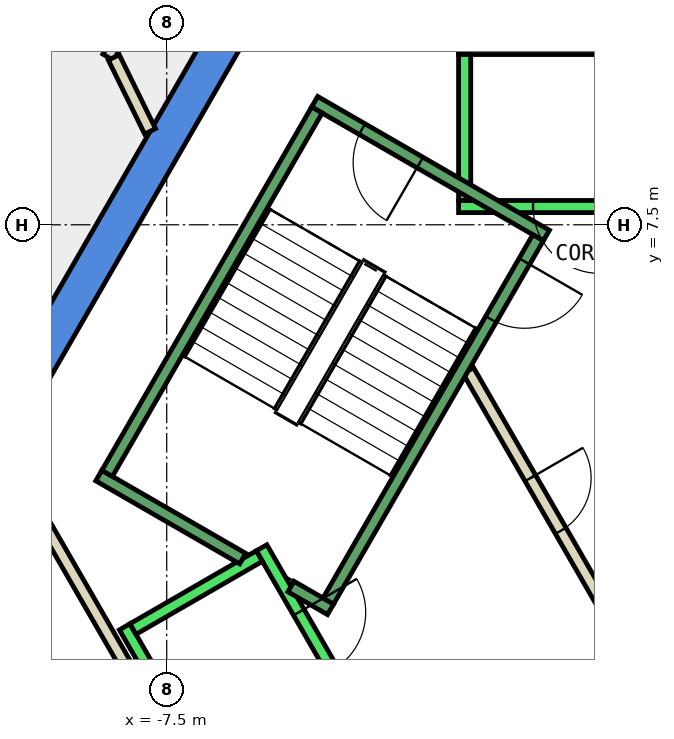
"""IFC4 building model, lengths in metres.
Left out: names, types, materials, properties, quantities, classifications, styles, units other than length and angle.
Written with IfcOpenShell. Run it as: python <this file> out.ifc"""

import sys

from ifc_helpers import new_model, si_unit, direction, frame, frame_2d, origin, place, context, subcontext, project, spatial, polyline, rectangle, outline, extrude, element, fill, save


model = new_model("IFC4")
c1 = context("Model", 3, precision=1e-05, world=origin(), true_north=direction((0.0, 1.0)))
c2 = subcontext(c1, "Body", "Model", "MODEL_VIEW")
j1 = project(units=[si_unit("LENGTHUNIT", "METRE"), si_unit("PLANEANGLEUNIT", "RADIAN")], contexts=[c1])
p1 = place(None, origin())
s1 = spatial("IfcSite", under=j1, at=p1, CompositionType="ELEMENT")
p2 = place(p1, origin())
s2 = spatial("IfcBuilding", under=s1, at=p2, CompositionType="ELEMENT")
p3 = place(p2, frame((0.0, 0.0, 266.6)))
s3 = spatial("IfcBuildingStorey", under=s2, at=p3, CompositionType="ELEMENT", Elevation=266.6)
p4 = place(p3, frame((0.0, 0.0, -0.34)))
e1 = element("IfcWall", 1, at=p4, inside=s3, PredefinedType="SHEAR", context=c2, shape_type="SweptSolid", body=[
    extrude(outline(polyline([(-10.535, 4.253), (-10.015, 3.953), (-5.427, 11.9), (-5.774, 12.5), (-10.535, 4.253)])), origin(), (0.0, 0.0, 1.0), 3.6),
])
p5 = place(p3, frame((0.0, 0.0, -0.34)))
e2 = element("IfcWall", 2, at=p5, inside=s3, PredefinedType="SHEAR", context=c2, shape_type="SweptSolid", body=[
    extrude(outline(polyline([(-11.547, 2.5), (-5.774, -7.5), (-5.427, -6.9), (-10.854, 2.5), (-11.547, 2.5)])), origin(), (0.0, 0.0, 1.0), 3.6),
])
p6 = place(p3, frame((-6.054, 14.264, 0.0), z_axis=(0.0, 0.0, 1.0), x_axis=(-0.515508653897, -0.856884372455, 0.0)))
e3 = element("IfcWall", 3, at=p6, inside=s3, PredefinedType="PARTITIONING", context=c2, shape_type="SweptSolid", body=[
    extrude(rectangle(XDim=4.677, YDim=0.2, at=frame_2d((2.339, 0.0))), origin(), (0.0, 0.0, 1.0), 3.26),
])
p7 = place(p6, frame((1.839, 0.0, 0.0)))
e4 = element("IfcOpeningElement", 4, at=p7, cuts=e3, PredefinedType="OPENING", context=c2, shape_type="SweptSolid", body=[
    extrude(rectangle(XDim=1.0, YDim=2.1, at=frame_2d((0.5, 1.05))), frame((0.0, 0.11, 0.0), z_axis=(0.0, -1.0, 0.0), x_axis=(1.0, 0.0, 0.0)), (0.0, 0.0, 1.0), 0.22),
])
p8 = place(p3, frame((-8.37, 10.252, 0.0), z_axis=(0.0, 0.0, 1.0), x_axis=(0.440562172885, -0.897722101668, 0.0)))
e5 = element("IfcWall", 5, at=p8, inside=s3, PredefinedType="PARTITIONING", context=c2, shape_type="SweptSolid", body=[
    extrude(rectangle(XDim=1.353, YDim=0.2, at=frame_2d((0.677, 0.0))), origin(), (0.0, 0.0, 1.0), 3.26),
])
p9 = place(p3, frame((-10.919, 10.057, 0.0), z_axis=(0.0, 0.0, 1.0), x_axis=(0.515568955032, 0.856848091908, 0.0)))
e6 = element("IfcWall", 6, at=p9, inside=s3, PredefinedType="PARTITIONING", context=c2, shape_type="SweptSolid", body=[
    extrude(rectangle(XDim=3.177, YDim=0.2, at=frame_2d((1.588, 0.0))), origin(), (0.0, 0.0, 1.0), 3.26),
])
p10 = place(p9, frame((1.088, 0.0, 0.0)))
e7 = element("IfcOpeningElement", 7, at=p10, cuts=e6, PredefinedType="OPENING", context=c2, shape_type="SweptSolid", body=[
    extrude(rectangle(XDim=1.0, YDim=2.1, at=frame_2d((0.5, 1.05))), frame((0.0, 0.11, 0.0), z_axis=(0.0, -1.0, 0.0), x_axis=(1.0, 0.0, 0.0)), (0.0, 0.0, 1.0), 0.22),
])
p11 = place(p3, frame((-9.751, 2.99, 0.0), z_axis=(0.0, 0.0, 1.0), x_axis=(0.500012163284, -0.866018381195, 0.0)))
e8 = element("IfcWall", 8, at=p11, inside=s3, PredefinedType="PARTITIONING", context=c2, shape_type="SweptSolid", body=[
    extrude(rectangle(XDim=8.0, YDim=0.2, at=frame_2d((4.0, 0.0))), origin(), (0.0, 0.0, 1.0), 3.26),
])
p12 = place(p3, frame((-0.982, -1.0, 0.0), z_axis=(0.0, 0.0, 1.0), x_axis=(0.50024047865, 0.865886518847, 0.0)))
e9 = element("IfcWall", 9, at=p12, inside=s3, PredefinedType="PARTITIONING", context=c2, shape_type="SweptSolid", body=[
    extrude(rectangle(XDim=1.863, YDim=0.2, at=frame_2d((0.931, 0.0))), origin(), (0.0, 0.0, 1.0), 3.26),
])
p13 = place(p3, frame((-2.54, 5.1, 0.0), z_axis=(0.0, 0.0, 1.0), x_axis=(0.499925051871, -0.866068670783, 0.0)))
e10 = element("IfcWall", 10, at=p13, inside=s3, PredefinedType="PARTITIONING", context=c2, shape_type="SweptSolid", body=[
    extrude(rectangle(XDim=5.181, YDim=0.2, at=frame_2d((2.59, 0.0))), origin(), (0.0, 0.0, 1.0), 3.26),
])
p14 = place(p13, frame((2.04, 0.0, 0.0)))
e11 = element("IfcOpeningElement", 11, at=p14, cuts=e10, PredefinedType="OPENING", context=c2, shape_type="SweptSolid", body=[
    extrude(rectangle(XDim=1.0, YDim=2.1, at=frame_2d((0.5, 1.05))), frame((0.0, 0.11, 0.0), z_axis=(0.0, -1.0, 0.0), x_axis=(1.0, 0.0, 0.0)), (0.0, 0.0, 1.0), 0.22),
])
p15 = place(p3, frame((2.7, 7.8, 0.0), z_axis=(0.0, 0.0, 1.0), x_axis=(-1.0, 0.0, 0.0)))
e12 = element("IfcWall", 12, at=p15, inside=s3, PredefinedType="STANDARD", context=c2, shape_type="SweptSolid", body=[
    extrude(rectangle(XDim=5.4, YDim=0.2, at=frame_2d((2.7, 0.0))), origin(), (0.0, 0.0, 1.0), 3.26),
])
p16 = place(p15, frame((1.225, 0.0, 0.0)))
e13 = element("IfcOpeningElement", 13, at=p16, cuts=e12, PredefinedType="OPENING", context=c2, shape_type="SweptSolid", body=[
    extrude(rectangle(XDim=1.1, YDim=2.1, at=frame_2d((0.55, 1.05))), frame((0.0, 0.11, 0.0), z_axis=(0.0, -1.0, 0.0), x_axis=(1.0, 0.0, 0.0)), (0.0, 0.0, 1.0), 0.22),
])
p17 = place(p15, frame((3.075, 0.0, 0.0)))
e14 = element("IfcOpeningElement", 14, at=p17, cuts=e12, PredefinedType="OPENING", context=c2, shape_type="SweptSolid", body=[
    extrude(rectangle(XDim=1.1, YDim=2.1, at=frame_2d((0.55, 1.05))), frame((0.0, 0.11, 0.0), z_axis=(0.0, -1.0, 0.0), x_axis=(1.0, 0.0, 0.0)), (0.0, 0.0, 1.0), 0.22),
])
p18 = place(p3, frame((2.7, 10.4, 0.0), z_axis=(0.0, 0.0, 1.0), x_axis=(-1.0, 0.0, 0.0)))
e15 = element("IfcWall", 15, at=p18, inside=s3, PredefinedType="STANDARD", context=c2, shape_type="SweptSolid", body=[
    extrude(rectangle(XDim=5.4, YDim=0.2, at=frame_2d((2.7, 0.0))), origin(), (0.0, 0.0, 1.0), 3.26),
])
p19 = place(p3, frame((-2.6, 7.9, 0.0), z_axis=(0.0, 0.0, 1.0), x_axis=(0.0, 1.0, 0.0)))
e16 = element("IfcWall", 16, at=p19, inside=s3, PredefinedType="STANDARD", context=c2, shape_type="SweptSolid", body=[
    extrude(rectangle(XDim=2.4, YDim=0.2, at=frame_2d((1.2, 0.0))), origin(), (0.0, 0.0, 1.0), 3.26),
])
p20 = place(p3, frame((-5.94, 2.188, 0.0), z_axis=(0.0, 0.0, 1.0), x_axis=(0.500034260056, -0.866005622828, 0.0)))
e17 = element("IfcWall", 17, at=p20, inside=s3, PredefinedType="STANDARD", context=c2, shape_type="SweptSolid", body=[
    extrude(rectangle(XDim=5.399, YDim=0.2, at=frame_2d((2.7, 0.0))), origin(), (0.0, 0.0, 1.0), 3.26),
])
p21 = place(p20, frame((3.075, 0.0, 0.0)))
e18 = element("IfcOpeningElement", 18, at=p21, cuts=e17, PredefinedType="OPENING", context=c2, shape_type="SweptSolid", body=[
    extrude(rectangle(XDim=1.1, YDim=2.1, at=frame_2d((0.55, 1.05))), frame((0.0, 0.11, 0.0), z_axis=(0.0, -1.0, 0.0), x_axis=(1.0, 0.0, 0.0)), (0.0, 0.0, 1.0), 0.22),
])
p22 = place(p20, frame((1.225, 0.0, 0.0)))
e19 = element("IfcOpeningElement", 19, at=p22, cuts=e17, PredefinedType="OPENING", context=c2, shape_type="SweptSolid", body=[
    extrude(rectangle(XDim=1.1, YDim=2.1, at=frame_2d((0.55, 1.05))), frame((0.0, 0.11, 0.0), z_axis=(0.0, -1.0, 0.0), x_axis=(1.0, 0.0, 0.0)), (0.0, 0.0, 1.0), 0.22),
])
p23 = place(p3, frame((-8.192, 0.888, 0.0), z_axis=(0.0, 0.0, 1.0), x_axis=(0.500034260056, -0.866005622828, 0.0)))
e20 = element("IfcWall", 20, at=p23, inside=s3, PredefinedType="STANDARD", context=c2, shape_type="SweptSolid", body=[
    extrude(rectangle(XDim=5.399, YDim=0.2, at=frame_2d((2.7, 0.0))), origin(), (0.0, 0.0, 1.0), 3.26),
])
p24 = place(p3, frame((-5.977, 2.052, 0.0), z_axis=(0.0, 0.0, 1.0), x_axis=(-0.865973769406, -0.500089422704, 0.0)))
e21 = element("IfcWall", 21, at=p24, inside=s3, PredefinedType="STANDARD", context=c2, shape_type="SweptSolid", body=[
    extrude(rectangle(XDim=2.399, YDim=0.2, at=frame_2d((1.2, 0.0))), origin(), (0.0, 0.0, 1.0), 3.26),
])
p25 = place(p3, frame((-1.256, 7.324, 0.0), z_axis=(0.0, 0.0, 1.0), x_axis=(-0.866046073146, 0.499964197906, 0.0)))
e22 = element("IfcWall", 22, at=p25, inside=s3, PredefinedType="STANDARD", context=c2, shape_type="SweptSolid", body=[
    extrude(rectangle(XDim=4.4, YDim=0.2, at=frame_2d((2.2, 0.0))), origin(), (0.0, 0.0, 1.0), 3.26),
])
p26 = place(p25, frame((2.4, 0.0, 0.0)))
e23 = element("IfcOpeningElement", 23, at=p26, cuts=e22, PredefinedType="OPENING", context=c2, shape_type="SweptSolid", body=[
    extrude(rectangle(XDim=1.1, YDim=2.2, at=frame_2d((0.55, 1.1))), frame((0.0, 0.11, 0.0), z_axis=(0.0, -1.0, 0.0), x_axis=(1.0, 0.0, 0.0)), (0.0, 0.0, 1.0), 0.22),
])
p27 = place(p3, frame((-6.25, 2.01, 0.0), z_axis=(0.0, 0.0, 1.0), x_axis=(-0.86611865017, 0.499838457731, 0.0)))
e24 = element("IfcWall", 24, at=p27, inside=s3, PredefinedType="STANDARD", context=c2, shape_type="SweptSolid", body=[
    extrude(rectangle(XDim=2.733, YDim=0.2, at=frame_2d((1.366, 0.0))), origin(), (0.0, 0.0, 1.0), 3.26),
])
p28 = place(p3, frame((-4.806, 1.176, 0.0), z_axis=(0.0, 0.0, 1.0), x_axis=(-0.866558586415, 0.499075361355, 0.0)))
e25 = element("IfcWall", 25, at=p28, inside=s3, PredefinedType="STANDARD", context=c2, shape_type="SweptSolid", body=[
    extrude(rectangle(XDim=0.751, YDim=0.2, at=frame_2d((0.376, 0.0))), origin(), (0.0, 0.0, 1.0), 3.26),
])
p29 = place(p3, frame((-1.393, 7.288, 0.0), z_axis=(0.0, 0.0, 1.0), x_axis=(-0.499963383562, -0.866046543262, 0.0)))
e26 = element("IfcWall", 26, at=p29, inside=s3, PredefinedType="STANDARD", context=c2, shape_type="SweptSolid", body=[
    extrude(rectangle(XDim=6.9, YDim=0.2, at=frame_2d((3.45, 0.0))), origin(), (0.0, 0.0, 1.0), 3.26),
])
p30 = place(p29, frame((0.45, 0.0, 0.0)))
e27 = element("IfcOpeningElement", 27, at=p30, cuts=e26, PredefinedType="OPENING", context=c2, shape_type="SweptSolid", body=[
    extrude(rectangle(XDim=1.1, YDim=2.2, at=frame_2d((0.55, 1.1))), frame((0.0, 0.11, 0.0), z_axis=(0.0, -1.0, 0.0), x_axis=(1.0, 0.0, 0.0)), (0.0, 0.0, 1.0), 0.22),
])
p31 = place(p3, frame((-5.03, 9.388, 0.0), z_axis=(0.0, 0.0, 1.0), x_axis=(-0.499978703459, -0.866037698999, 0.0)))
e28 = element("IfcWall", 28, at=p31, inside=s3, PredefinedType="STANDARD", context=c2, shape_type="SweptSolid", body=[
    extrude(rectangle(XDim=6.9, YDim=0.2, at=frame_2d((3.45, 0.0))), origin(), (0.0, 0.0, 1.0), 3.26),
])
p32 = place(p14, origin())
e29 = element("IfcDoor", 29, at=p32, inside=s3, OperationType="SINGLE_SWING_RIGHT", PredefinedType="DOOR", context=c2, shape_type="SweptSolid", body=[
    extrude(rectangle(XDim=1.0, YDim=2.1, at=frame_2d((0.5, 1.05))), frame((0.0, 0.025, 0.0), z_axis=(0.0, -1.0, 0.0), x_axis=(1.0, 0.0, 0.0)), (0.0, 0.0, 1.0), 0.05),
])
fill(e11, e29)
p33 = place(p17, origin())
e30 = element("IfcDoor", 30, at=p33, inside=s3, OperationType="SLIDING_TO_LEFT", PredefinedType="DOOR", context=c2, shape_type="SweptSolid", body=[
    extrude(rectangle(XDim=1.1, YDim=2.1, at=frame_2d((0.55, 1.05))), frame((0.0, 0.025, 0.0), z_axis=(0.0, -1.0, 0.0), x_axis=(1.0, 0.0, 0.0)), (0.0, 0.0, 1.0), 0.05),
])
fill(e14, e30)
p34 = place(p22, origin())
e31 = element("IfcDoor", 31, at=p34, inside=s3, OperationType="SLIDING_TO_LEFT", PredefinedType="DOOR", context=c2, shape_type="SweptSolid", body=[
    extrude(rectangle(XDim=1.1, YDim=2.1, at=frame_2d((0.55, 1.05))), frame((0.0, 0.025, 0.0), z_axis=(0.0, -1.0, 0.0), x_axis=(1.0, 0.0, 0.0)), (0.0, 0.0, 1.0), 0.05),
])
fill(e19, e31)
p35 = place(p30, origin())
e32 = element("IfcDoor", 32, at=p35, inside=s3, OperationType="SINGLE_SWING_LEFT", PredefinedType="DOOR", context=c2, shape_type="SweptSolid", body=[
    extrude(rectangle(XDim=1.1, YDim=2.2, at=frame_2d((0.55, 1.1))), frame((0.0, 0.025, 0.0), z_axis=(0.0, -1.0, 0.0), x_axis=(1.0, 0.0, 0.0)), (0.0, 0.0, 1.0), 0.05),
])
fill(e27, e32)
p36 = place(p26, origin())
e33 = element("IfcDoor", 33, at=p36, inside=s3, OperationType="SINGLE_SWING_LEFT", PredefinedType="DOOR", context=c2, shape_type="SweptSolid", body=[
    extrude(rectangle(XDim=1.1, YDim=2.2, at=frame_2d((0.55, 1.1))), frame((0.0, 0.025, 0.0), z_axis=(0.0, -1.0, 0.0), x_axis=(1.0, 0.0, 0.0)), (0.0, 0.0, 1.0), 0.05),
])
fill(e23, e33)
save(model, sys.argv[1])
